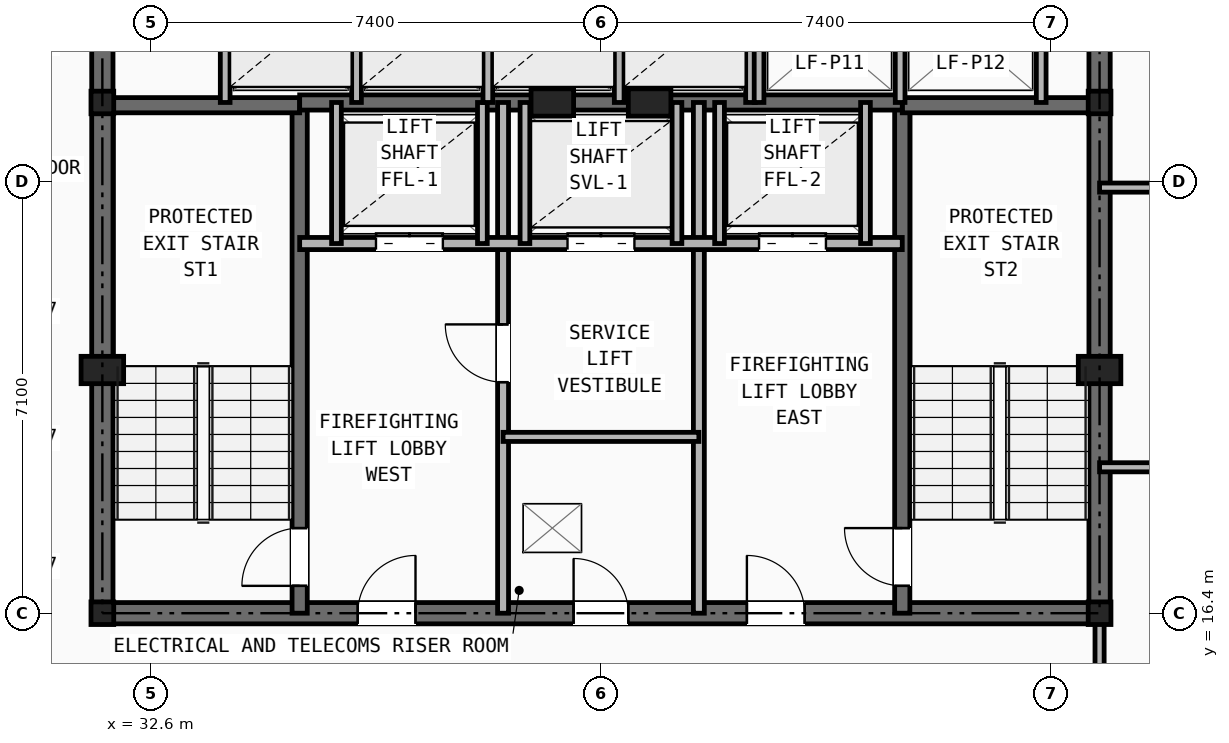
"""IFC4 building model, lengths in metres.
Left out: names, types, materials, properties, quantities, classifications, styles, units other than length and angle.
Written with IfcOpenShell. Run it as: python <this file> out.ifc"""

import sys

from ifc_helpers import new_model, si_unit, direction, frame, frame_2d, origin, origin_2d, place, context, subcontext, project, spatial, rectangle, i_section, extrude, element, fill, save


model = new_model("IFC4")
c1 = context("Model", 3, precision=1e-05, world=origin(), true_north=direction((0.0, 1.0)))
c2 = subcontext(c1, "Body", "Model", "MODEL_VIEW")
j1 = project(units=[si_unit("LENGTHUNIT", "METRE"), si_unit("PLANEANGLEUNIT", "RADIAN")], contexts=[c1])
p1 = place(None, origin())
s1 = spatial("IfcSite", under=j1, at=p1, CompositionType="ELEMENT")
p2 = place(p1, origin())
s2 = spatial("IfcBuilding", under=s1, at=p2, CompositionType="ELEMENT")
p3 = place(p2, frame((0.0, 0.0, 129.8)))
s3 = spatial("IfcBuildingStorey", under=s2, at=p3, CompositionType="ELEMENT", Elevation=129.8)
for number, where, z_axis, x_axis in (
    (1, (31.8, 16.4, 0.0), (0.0, 0.0, 1.0), (1.0, 0.0, 0.0)),
    (2, (48.2, 16.4, 0.0), (0.0, 0.0, 1.0), (1.0, 0.0, 0.0)),
    (3, (31.8, 24.8, 0.0), (0.0, 0.0, 1.0), (1.0, 0.0, 0.0)),
    (4, (48.2, 24.8, 0.0), (0.0, 0.0, 1.0), (1.0, 0.0, 0.0)),
):
    element("IfcColumn", number, at=place(p3, frame(where, z_axis=z_axis, x_axis=x_axis)), inside=s3, PredefinedType="COLUMN", context=c2, shape_type="SweptSolid", body=[
        extrude(i_section(OverallWidth=0.374, OverallDepth=0.372, WebThickness=0.016, FlangeThickness=0.026, at=origin_2d()), origin(), (0.0, 0.0, 1.0), 3.45),
    ])
for number, where, z_axis, x_axis in (
    (5, (31.8, 20.4, 0.0), (0.0, 0.0, 1.0), (1.0, 0.0, 0.0)),
    (6, (48.2, 20.4, 0.0), (0.0, 0.0, 1.0), (1.0, 0.0, 0.0)),
    (7, (39.2, 24.8, 0.0), (0.0, 0.0, 1.0), (1.0, 0.0, 0.0)),
    (8, (40.8, 24.8, 0.0), (0.0, 0.0, 1.0), (1.0, 0.0, 0.0)),
):
    element("IfcColumn", number, at=place(p3, frame(where, z_axis=z_axis, x_axis=x_axis)), inside=s3, PredefinedType="PILASTER", context=c2, shape_type="SweptSolid", body=[
        extrude(rectangle(XDim=0.7, YDim=0.45, at=origin_2d()), origin(), (0.0, 0.0, 1.0), 3.45),
    ])
p4 = place(p3, frame((31.8, 16.4, 0.0), z_axis=(0.0, 0.0, 1.0), x_axis=(1.0, 0.0, 0.0)))
e9 = element("IfcWall", 9, at=p4, inside=s3, PredefinedType="SHEAR", context=c2, shape_type="SweptSolid", body=[
    extrude(rectangle(XDim=16.4, YDim=0.35, at=frame_2d((8.2, 0.0))), origin(), (0.0, 0.0, 1.0), 3.21),
])
p5 = place(p4, frame((7.75, 0.0, 0.0)))
e10 = element("IfcOpeningElement", 10, at=p5, cuts=e9, PredefinedType="OPENING", context=c2, shape_type="SweptSolid", body=[
    extrude(rectangle(XDim=0.9, YDim=2.1, at=frame_2d((0.45, 1.05))), frame((0.0, 0.185, 0.0), z_axis=(0.0, -1.0, 0.0), x_axis=(1.0, 0.0, 0.0)), (0.0, 0.0, 1.0), 0.37),
])
p6 = place(p4, frame((4.2, 0.0, 0.0)))
e11 = element("IfcOpeningElement", 11, at=p6, cuts=e9, PredefinedType="OPENING", context=c2, shape_type="SweptSolid", body=[
    extrude(rectangle(XDim=0.95, YDim=2.1, at=frame_2d((0.475, 1.05))), frame((0.0, 0.185, 0.0), z_axis=(0.0, -1.0, 0.0), x_axis=(1.0, 0.0, 0.0)), (0.0, 0.0, 1.0), 0.37),
])
p7 = place(p4, frame((10.6, 0.0, 0.0)))
e12 = element("IfcOpeningElement", 12, at=p7, cuts=e9, PredefinedType="OPENING", context=c2, shape_type="SweptSolid", body=[
    extrude(rectangle(XDim=0.95, YDim=2.1, at=frame_2d((0.475, 1.05))), frame((0.0, 0.185, 0.0), z_axis=(0.0, -1.0, 0.0), x_axis=(1.0, 0.0, 0.0)), (0.0, 0.0, 1.0), 0.37),
])
p8 = place(p3, frame((31.8, 16.4, 0.0), z_axis=(0.0, 0.0, 1.0), x_axis=(0.0, 1.0, 0.0)))
e13 = element("IfcWall", 13, at=p8, inside=s3, PredefinedType="SHEAR", context=c2, shape_type="SweptSolid", body=[
    extrude(rectangle(XDim=14.8, YDim=0.35, at=frame_2d((7.4, 0.0))), origin(), (0.0, 0.0, 1.0), 3.21),
])
p9 = place(p8, frame((11.0, 0.0, 0.0)))
e14 = element("IfcOpeningElement", 14, at=p9, cuts=e13, PredefinedType="OPENING", context=c2, shape_type="SweptSolid", body=[
    extrude(rectangle(XDim=1.1, YDim=2.15, at=frame_2d((0.55, 1.075))), frame((0.0, 0.185, 0.0), z_axis=(0.0, -1.0, 0.0), x_axis=(1.0, 0.0, 0.0)), (0.0, 0.0, 1.0), 0.37),
])
p10 = place(p3, frame((48.2, 16.4, 0.0), z_axis=(0.0, 0.0, 1.0), x_axis=(0.0, 1.0, 0.0)))
e15 = element("IfcWall", 15, at=p10, inside=s3, PredefinedType="SHEAR", context=c2, shape_type="SweptSolid", body=[
    extrude(rectangle(XDim=14.8, YDim=0.35, at=frame_2d((7.4, 0.0))), origin(), (0.0, 0.0, 1.0), 3.21),
])
p11 = place(p10, frame((11.0, 0.0, 0.0)))
e16 = element("IfcOpeningElement", 16, at=p11, cuts=e15, PredefinedType="OPENING", context=c2, shape_type="SweptSolid", body=[
    extrude(rectangle(XDim=1.1, YDim=2.15, at=frame_2d((0.55, 1.075))), frame((0.0, 0.185, 0.0), z_axis=(0.0, -1.0, 0.0), x_axis=(1.0, 0.0, 0.0)), (0.0, 0.0, 1.0), 0.37),
])
p12 = place(p3, frame((35.045, 16.4, 0.0), z_axis=(0.0, 0.0, 1.0), x_axis=(0.0, 1.0, 0.0)))
e17 = element("IfcWall", 17, at=p12, inside=s3, PredefinedType="SHEAR", context=c2, shape_type="SweptSolid", body=[
    extrude(rectangle(XDim=8.4, YDim=0.25, at=frame_2d((4.2, 0.0))), origin(), (0.0, 0.0, 1.0), 3.21),
])
p13 = place(p12, frame((0.45, 0.0, 0.0)))
e18 = element("IfcOpeningElement", 18, at=p13, cuts=e17, PredefinedType="OPENING", context=c2, shape_type="SweptSolid", body=[
    extrude(rectangle(XDim=0.95, YDim=2.1, at=frame_2d((0.475, 1.05))), frame((0.0, 0.135, 0.0), z_axis=(0.0, -1.0, 0.0), x_axis=(1.0, 0.0, 0.0)), (0.0, 0.0, 1.0), 0.27),
])
p14 = place(p3, frame((31.8, 24.755, 0.0), z_axis=(0.0, 0.0, 1.0), x_axis=(1.0, 0.0, 0.0)))
e19 = element("IfcWall", 19, at=p14, inside=s3, PredefinedType="SHEAR", context=c2, shape_type="SweptSolid", body=[
    extrude(rectangle(XDim=3.245, YDim=0.25, at=frame_2d((1.623, 0.0))), origin(), (0.0, 0.0, 1.0), 3.21),
])
p15 = place(p3, frame((44.955, 16.4, 0.0), z_axis=(0.0, 0.0, 1.0), x_axis=(0.0, 1.0, 0.0)))
e20 = element("IfcWall", 20, at=p15, inside=s3, PredefinedType="SHEAR", context=c2, shape_type="SweptSolid", body=[
    extrude(rectangle(XDim=8.4, YDim=0.25, at=frame_2d((4.2, 0.0))), origin(), (0.0, 0.0, 1.0), 3.21),
])
p16 = place(p15, frame((0.45, 0.0, 0.0)))
e21 = element("IfcOpeningElement", 21, at=p16, cuts=e20, PredefinedType="OPENING", context=c2, shape_type="SweptSolid", body=[
    extrude(rectangle(XDim=0.95, YDim=2.1, at=frame_2d((0.475, 1.05))), frame((0.0, 0.135, 0.0), z_axis=(0.0, -1.0, 0.0), x_axis=(1.0, 0.0, 0.0)), (0.0, 0.0, 1.0), 0.27),
])
p17 = place(p3, frame((44.955, 24.755, 0.0), z_axis=(0.0, 0.0, 1.0), x_axis=(1.0, 0.0, 0.0)))
e22 = element("IfcWall", 22, at=p17, inside=s3, PredefinedType="SHEAR", context=c2, shape_type="SweptSolid", body=[
    extrude(rectangle(XDim=3.245, YDim=0.25, at=frame_2d((1.623, 0.0))), origin(), (0.0, 0.0, 1.0), 3.21),
])
p18 = place(p3, frame((35.045, 24.8, 0.0), z_axis=(0.0, 0.0, 1.0), x_axis=(1.0, 0.0, 0.0)))
e23 = element("IfcWall", 23, at=p18, inside=s3, PredefinedType="SHEAR", context=c2, shape_type="SweptSolid", body=[
    extrude(rectangle(XDim=9.91, YDim=0.25, at=frame_2d((4.955, 0.0))), origin(), (0.0, 0.0, 1.0), 3.21),
])
p19 = place(p3, frame((38.39, 16.4, 0.0), z_axis=(0.0, 0.0, 1.0), x_axis=(0.0, 1.0, 0.0)))
e24 = element("IfcWall", 24, at=p19, inside=s3, PredefinedType="PARTITIONING", context=c2, shape_type="SweptSolid", body=[
    extrude(rectangle(XDim=8.4, YDim=0.18, at=frame_2d((4.2, 0.0))), origin(), (0.0, 0.0, 1.0), 2.661),
])
p20 = place(p19, frame((3.8, 0.0, 0.0)))
e25 = element("IfcOpeningElement", 25, at=p20, cuts=e24, PredefinedType="OPENING", context=c2, shape_type="SweptSolid", body=[
    extrude(rectangle(XDim=0.95, YDim=2.1, at=frame_2d((0.475, 1.05))), frame((0.0, 0.1, 0.0), z_axis=(0.0, -1.0, 0.0), x_axis=(1.0, 0.0, 0.0)), (0.0, 0.0, 1.0), 0.2),
])
p21 = place(p3, frame((41.61, 16.4, 0.0), z_axis=(0.0, 0.0, 1.0), x_axis=(0.0, 1.0, 0.0)))
e26 = element("IfcWall", 26, at=p21, inside=s3, PredefinedType="PARTITIONING", context=c2, shape_type="SweptSolid", body=[
    extrude(rectangle(XDim=8.4, YDim=0.18, at=frame_2d((4.2, 0.0))), origin(), (0.0, 0.0, 1.0), 2.661),
])
p22 = place(p3, frame((35.045, 22.48, 0.0), z_axis=(0.0, 0.0, 1.0), x_axis=(1.0, 0.0, 0.0)))
e27 = element("IfcWall", 27, at=p22, inside=s3, PredefinedType="SOLIDWALL", context=c2, shape_type="SweptSolid", body=[
    extrude(rectangle(XDim=9.91, YDim=0.2, at=frame_2d((4.955, 0.0))), origin(), (0.0, 0.0, 1.0), 3.21),
])
p23 = place(p22, frame((1.255, 0.0, 0.0)))
e28 = element("IfcOpeningElement", 28, at=p23, cuts=e27, PredefinedType="OPENING", context=c2, shape_type="SweptSolid", body=[
    extrude(rectangle(XDim=1.1, YDim=2.15, at=frame_2d((0.55, 1.075))), frame((0.0, 0.11, 0.0), z_axis=(0.0, -1.0, 0.0), x_axis=(1.0, 0.0, 0.0)), (0.0, 0.0, 1.0), 0.22),
])
p24 = place(p22, frame((7.555, 0.0, 0.0)))
e29 = element("IfcOpeningElement", 29, at=p24, cuts=e27, PredefinedType="OPENING", context=c2, shape_type="SweptSolid", body=[
    extrude(rectangle(XDim=1.1, YDim=2.15, at=frame_2d((0.55, 1.075))), frame((0.0, 0.11, 0.0), z_axis=(0.0, -1.0, 0.0), x_axis=(1.0, 0.0, 0.0)), (0.0, 0.0, 1.0), 0.22),
])
p25 = place(p22, frame((4.405, 0.0, 0.0)))
e30 = element("IfcOpeningElement", 30, at=p25, cuts=e27, PredefinedType="OPENING", context=c2, shape_type="SweptSolid", body=[
    extrude(rectangle(XDim=1.1, YDim=2.15, at=frame_2d((0.55, 1.075))), frame((0.0, 0.11, 0.0), z_axis=(0.0, -1.0, 0.0), x_axis=(1.0, 0.0, 0.0)), (0.0, 0.0, 1.0), 0.22),
])
p26 = place(p3, frame((38.39, 19.3, 0.0), z_axis=(0.0, 0.0, 1.0), x_axis=(1.0, 0.0, 0.0)))
e31 = element("IfcWall", 31, at=p26, inside=s3, PredefinedType="PARTITIONING", context=c2, shape_type="SweptSolid", body=[
    extrude(rectangle(XDim=3.22, YDim=0.15, at=frame_2d((1.61, 0.0))), origin(), (0.0, 0.0, 1.0), 3.21),
])
for number, where, z_axis, x_axis in (
    (32, (35.65, 22.48, 0.0), (0.0, 0.0, 1.0), (0.0, 1.0, 0.0)),
    (33, (38.05, 22.48, 0.0), (0.0, 0.0, 1.0), (0.0, 1.0, 0.0)),
    (34, (41.95, 22.48, 0.0), (0.0, 0.0, 1.0), (0.0, 1.0, 0.0)),
    (35, (44.35, 22.48, 0.0), (0.0, 0.0, 1.0), (0.0, 1.0, 0.0)),
    (36, (38.75, 22.48, 0.0), (0.0, 0.0, 1.0), (0.0, 1.0, 0.0)),
    (37, (41.25, 22.48, 0.0), (0.0, 0.0, 1.0), (0.0, 1.0, 0.0)),
):
    element("IfcWall", number, at=place(p3, frame(where, z_axis=z_axis, x_axis=x_axis)), inside=s3, PredefinedType="SOLIDWALL", context=c2, shape_type="SweptSolid", body=[
        extrude(rectangle(XDim=2.32, YDim=0.16, at=frame_2d((1.16, 0.0))), origin(), (0.0, 0.0, 1.0), 3.21),
    ])
for number, where, z_axis, x_axis in (
    (38, (33.82, 24.8, 0.0), (0.0, 0.0, 1.0), (0.0, 1.0, 0.0)),
    (39, (35.98, 24.8, 0.0), (0.0, 0.0, 1.0), (0.0, 1.0, 0.0)),
    (40, (38.14, 24.8, 0.0), (0.0, 0.0, 1.0), (0.0, 1.0, 0.0)),
    (41, (40.3, 24.8, 0.0), (0.0, 0.0, 1.0), (0.0, 1.0, 0.0)),
    (42, (42.46, 24.8, 0.0), (0.0, 0.0, 1.0), (0.0, 1.0, 0.0)),
    (43, (42.6, 24.8, 0.0), (0.0, 0.0, 1.0), (0.0, 1.0, 0.0)),
    (44, (44.92, 24.8, 0.0), (0.0, 0.0, 1.0), (0.0, 1.0, 0.0)),
    (45, (47.24, 24.8, 0.0), (0.0, 0.0, 1.0), (0.0, 1.0, 0.0)),
):
    element("IfcWall", number, at=place(p3, frame(where, z_axis=z_axis, x_axis=x_axis)), inside=s3, PredefinedType="SOLIDWALL", context=c2, shape_type="SweptSolid", body=[
        extrude(rectangle(XDim=2.08, YDim=0.16, at=frame_2d((1.04, 0.0))), origin(), (0.0, 0.0, 1.0), 3.21),
    ])
p27 = place(p3, frame((48.2, 14.1, 0.0), z_axis=(0.0, 0.0, 1.0), x_axis=(0.0, 1.0, 0.0)))
e46 = element("IfcWall", 46, at=p27, inside=s3, PredefinedType="PARTITIONING", context=c2, shape_type="SweptSolid", body=[
    extrude(rectangle(XDim=2.3, YDim=0.15, at=frame_2d((1.15, 0.0))), origin(), (0.0, 0.0, 1.0), 2.661),
])
p28 = place(p3, frame((48.2, 18.8, 0.0), z_axis=(0.0, 0.0, 1.0), x_axis=(1.0, 0.0, 0.0)))
e47 = element("IfcWall", 47, at=p28, inside=s3, PredefinedType="PARTITIONING", context=c2, shape_type="SweptSolid", body=[
    extrude(rectangle(XDim=15.922, YDim=0.15, at=frame_2d((7.961, 0.0))), origin(), (0.0, 0.0, 1.0), 2.589),
])
p29 = place(p28, frame((1.4, 0.0, 0.0)))
e48 = element("IfcOpeningElement", 48, at=p29, cuts=e47, PredefinedType="OPENING", context=c2, shape_type="SweptSolid", body=[
    extrude(rectangle(XDim=0.95, YDim=2.1, at=frame_2d((0.475, 1.05))), frame((0.0, 0.085, 0.0), z_axis=(0.0, -1.0, 0.0), x_axis=(1.0, 0.0, 0.0)), (0.0, 0.0, 1.0), 0.17),
])
p30 = place(p3, frame((48.2, 23.4, 0.0), z_axis=(0.0, 0.0, 1.0), x_axis=(1.0, 0.0, 0.0)))
e49 = element("IfcWall", 49, at=p30, inside=s3, PredefinedType="PARTITIONING", context=c2, shape_type="SweptSolid", body=[
    extrude(rectangle(XDim=13.225, YDim=0.15, at=frame_2d((6.612, 0.0))), origin(), (0.0, 0.0, 1.0), 2.589),
])
p31 = place(p30, frame((1.4, 0.0, 0.0)))
e50 = element("IfcOpeningElement", 50, at=p31, cuts=e49, PredefinedType="OPENING", context=c2, shape_type="SweptSolid", body=[
    extrude(rectangle(XDim=0.95, YDim=2.1, at=frame_2d((0.475, 1.05))), frame((0.0, 0.085, 0.0), z_axis=(0.0, -1.0, 0.0), x_axis=(1.0, 0.0, 0.0)), (0.0, 0.0, 1.0), 0.17),
])
p32 = place(p5, origin())
e51 = element("IfcDoor", 51, at=p32, inside=s3, OperationType="SINGLE_SWING_LEFT", PredefinedType="DOOR", context=c2, shape_type="SweptSolid", body=[
    extrude(rectangle(XDim=0.9, YDim=2.1, at=frame_2d((0.45, 1.05))), frame((0.0, 0.025, 0.0), z_axis=(0.0, -1.0, 0.0), x_axis=(1.0, 0.0, 0.0)), (0.0, 0.0, 1.0), 0.05),
])
fill(e10, e51)
p33 = place(p20, origin())
e52 = element("IfcDoor", 52, at=p33, inside=s3, OperationType="SINGLE_SWING_RIGHT", PredefinedType="DOOR", context=c2, shape_type="SweptSolid", body=[
    extrude(rectangle(XDim=0.95, YDim=2.1, at=frame_2d((0.475, 1.05))), frame((0.0, 0.025, 0.0), z_axis=(0.0, -1.0, 0.0), x_axis=(1.0, 0.0, 0.0)), (0.0, 0.0, 1.0), 0.05),
])
fill(e25, e52)
p34 = place(p13, origin())
e53 = element("IfcDoor", 53, at=p34, inside=s3, OperationType="SINGLE_SWING_LEFT", PredefinedType="DOOR", context=c2, shape_type="SweptSolid", body=[
    extrude(rectangle(XDim=0.95, YDim=2.1, at=frame_2d((0.475, 1.05))), frame((0.0, 0.025, 0.0), z_axis=(0.0, -1.0, 0.0), x_axis=(1.0, 0.0, 0.0)), (0.0, 0.0, 1.0), 0.05),
])
fill(e18, e53)
p35 = place(p16, origin())
e54 = element("IfcDoor", 54, at=p35, inside=s3, OperationType="SINGLE_SWING_RIGHT", PredefinedType="DOOR", context=c2, shape_type="SweptSolid", body=[
    extrude(rectangle(XDim=0.95, YDim=2.1, at=frame_2d((0.475, 1.05))), frame((0.0, 0.025, 0.0), z_axis=(0.0, -1.0, 0.0), x_axis=(1.0, 0.0, 0.0)), (0.0, 0.0, 1.0), 0.05),
])
fill(e21, e54)
p36 = place(p6, origin())
e55 = element("IfcDoor", 55, at=p36, inside=s3, OperationType="SINGLE_SWING_RIGHT", PredefinedType="DOOR", context=c2, shape_type="SweptSolid", body=[
    extrude(rectangle(XDim=0.95, YDim=2.1, at=frame_2d((0.475, 1.05))), frame((0.0, 0.025, 0.0), z_axis=(0.0, -1.0, 0.0), x_axis=(1.0, 0.0, 0.0)), (0.0, 0.0, 1.0), 0.05),
])
fill(e11, e55)
p37 = place(p7, origin())
e56 = element("IfcDoor", 56, at=p37, inside=s3, OperationType="SINGLE_SWING_LEFT", PredefinedType="DOOR", context=c2, shape_type="SweptSolid", body=[
    extrude(rectangle(XDim=0.95, YDim=2.1, at=frame_2d((0.475, 1.05))), frame((0.0, 0.025, 0.0), z_axis=(0.0, -1.0, 0.0), x_axis=(1.0, 0.0, 0.0)), (0.0, 0.0, 1.0), 0.05),
])
fill(e12, e56)
p38 = place(p23, origin())
e57 = element("IfcDoor", 57, at=p38, inside=s3, OperationType="DOUBLE_DOOR_SLIDING", PredefinedType="DOOR", context=c2, shape_type="SweptSolid", body=[
    extrude(rectangle(XDim=1.1, YDim=2.15, at=frame_2d((0.55, 1.075))), frame((0.0, 0.025, 0.0), z_axis=(0.0, -1.0, 0.0), x_axis=(1.0, 0.0, 0.0)), (0.0, 0.0, 1.0), 0.05),
])
fill(e28, e57)
p39 = place(p24, origin())
e58 = element("IfcDoor", 58, at=p39, inside=s3, OperationType="DOUBLE_DOOR_SLIDING", PredefinedType="DOOR", context=c2, shape_type="SweptSolid", body=[
    extrude(rectangle(XDim=1.1, YDim=2.15, at=frame_2d((0.55, 1.075))), frame((0.0, 0.025, 0.0), z_axis=(0.0, -1.0, 0.0), x_axis=(1.0, 0.0, 0.0)), (0.0, 0.0, 1.0), 0.05),
])
fill(e29, e58)
p40 = place(p25, origin())
e59 = element("IfcDoor", 59, at=p40, inside=s3, OperationType="DOUBLE_DOOR_SLIDING", PredefinedType="DOOR", context=c2, shape_type="SweptSolid", body=[
    extrude(rectangle(XDim=1.1, YDim=2.15, at=frame_2d((0.55, 1.075))), frame((0.0, 0.025, 0.0), z_axis=(0.0, -1.0, 0.0), x_axis=(1.0, 0.0, 0.0)), (0.0, 0.0, 1.0), 0.05),
])
fill(e30, e59)
save(model, sys.argv[1])
